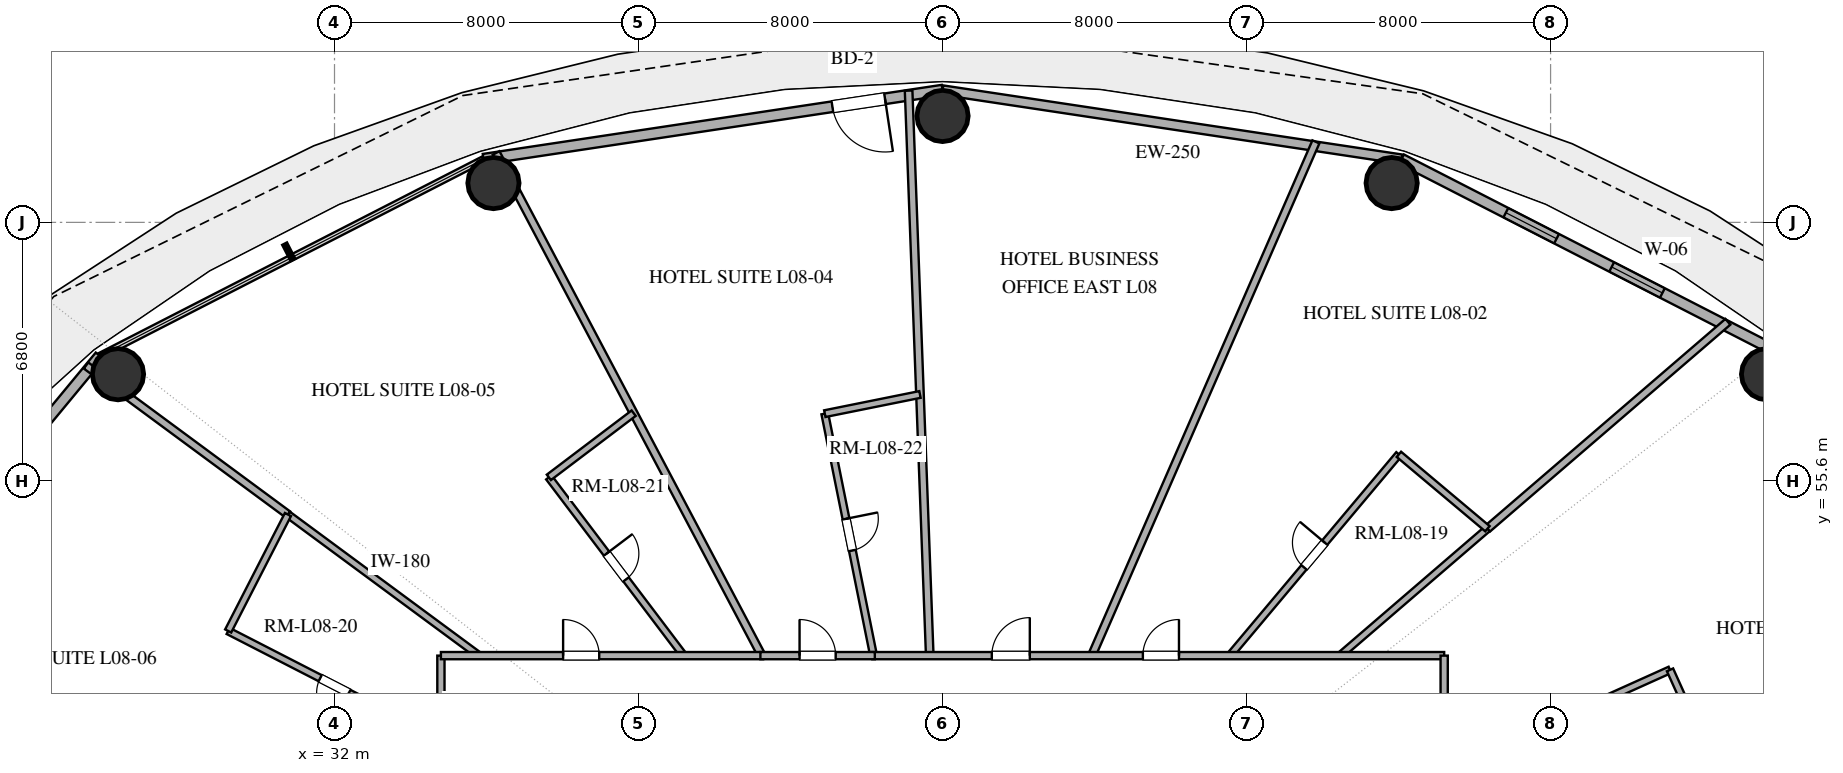
"""IFC4 building model, lengths in metres.
Left out: names, types, materials, properties, quantities, classifications, styles, units other than length and angle.
Written with IfcOpenShell. Run it as: python <this file> out.ifc"""

import sys

from ifc_helpers import new_model, si_unit, direction, frame, frame_2d, origin, origin_2d, place, context, subcontext, project, spatial, rectangle, hollow_circle, extrude, element, fill, save


model = new_model("IFC4")
c1 = context("Model", 3, precision=1e-05, world=origin(), true_north=direction((0.0, 1.0)))
c2 = subcontext(c1, "Body", "Model", "MODEL_VIEW")
j1 = project(units=[si_unit("LENGTHUNIT", "METRE"), si_unit("PLANEANGLEUNIT", "RADIAN")], contexts=[c1])
p1 = place(None, origin())
s1 = spatial("IfcSite", under=j1, at=p1, CompositionType="ELEMENT")
p2 = place(p1, origin())
s2 = spatial("IfcBuilding", under=s1, at=p2, CompositionType="ELEMENT")
p3 = place(p2, frame((0.0, 0.0, 39.0)))
s3 = spatial("IfcBuildingStorey", under=s2, at=p3, CompositionType="ELEMENT", Elevation=39.0)
for number, where, z_axis, x_axis in (
    (1, (69.697, 58.405, 0.0), (0.0, 0.0, 1.0), (1.0, 0.0, 0.0)),
    (2, (59.818, 63.434, 0.0), (0.0, 0.0, 1.0), (1.0, 0.0, 0.0)),
    (3, (48.0, 65.2, 0.0), (0.0, 0.0, 1.0), (1.0, 0.0, 0.0)),
    (4, (36.182, 63.434, 0.0), (0.0, 0.0, 1.0), (1.0, 0.0, 0.0)),
    (5, (26.303, 58.405, 0.0), (0.0, 0.0, 1.0), (1.0, 0.0, 0.0)),
):
    element("IfcColumn", number, at=place(p3, frame(where, z_axis=z_axis, x_axis=x_axis)), inside=s3, PredefinedType="COLUMN", context=c2, shape_type="SweptSolid", body=[
        extrude(hollow_circle(Radius=0.675, WallThickness=0.036, at=origin_2d()), origin(), (0.0, 0.0, 1.0), 3.38),
    ])
p4 = place(p3, frame((70.174, 58.886, 0.0), z_axis=(0.0, 0.0, 1.0), x_axis=(-0.889853976658, 0.456245438581, 0.0)))
e6 = element("IfcWall", 6, at=p4, inside=s3, PredefinedType="SOLIDWALL", context=c2, shape_type="SweptSolid", body=[
    extrude(rectangle(XDim=11.346, YDim=0.28, at=frame_2d((5.673, 0.0))), origin(), (0.0, 0.0, 1.0), 3.38),
])
p5 = place(p4, frame((3.632, 0.0, 0.85)))
e7 = element("IfcOpeningElement", 7, at=p5, cuts=e6, PredefinedType="OPENING", context=c2, shape_type="SweptSolid", body=[
    extrude(rectangle(XDim=1.5, YDim=2.0, at=frame_2d((0.75, 1.0))), frame((0.0, 0.15, 0.0), z_axis=(0.0, -1.0, 0.0), x_axis=(1.0, 0.0, 0.0)), (0.0, 0.0, 1.0), 0.3),
])
p6 = place(p4, frame((6.761, 0.0, 0.85)))
e8 = element("IfcOpeningElement", 8, at=p6, cuts=e6, PredefinedType="OPENING", context=c2, shape_type="SweptSolid", body=[
    extrude(rectangle(XDim=1.5, YDim=2.0, at=frame_2d((0.75, 1.0))), frame((0.0, 0.15, 0.0), z_axis=(0.0, -1.0, 0.0), x_axis=(1.0, 0.0, 0.0)), (0.0, 0.0, 1.0), 0.3),
])
p7 = place(p3, frame((60.078, 64.062, 0.0), z_axis=(0.0, 0.0, 1.0), x_axis=(-0.988864835849, 0.148816452121, 0.0)))
e9 = element("IfcWall", 9, at=p7, inside=s3, PredefinedType="SOLIDWALL", context=c2, shape_type="SweptSolid", body=[
    extrude(rectangle(XDim=12.214, YDim=0.25, at=frame_2d((6.107, 0.0))), origin(), (0.0, 0.0, 1.0), 3.38),
])
p8 = place(p3, frame((48.0, 65.88, 0.0), z_axis=(0.0, 0.0, 1.0), x_axis=(-0.988864835849, -0.148816452121, 0.0)))
e10 = element("IfcWall", 10, at=p8, inside=s3, PredefinedType="SOLIDWALL", context=c2, shape_type="SweptSolid", body=[
    extrude(rectangle(XDim=12.214, YDim=0.28, at=frame_2d((6.107, 0.0))), origin(), (0.0, 0.0, 1.0), 3.38),
])
p9 = place(p8, frame((1.531, 0.0, 0.0)))
e11 = element("IfcOpeningElement", 11, at=p9, cuts=e10, PredefinedType="OPENING", context=c2, shape_type="SweptSolid", body=[
    extrude(rectangle(XDim=1.4, YDim=2.2, at=frame_2d((0.7, 1.1))), frame((0.0, 0.15, 0.0), z_axis=(0.0, -1.0, 0.0), x_axis=(1.0, 0.0, 0.0)), (0.0, 0.0, 1.0), 0.3),
])
p10 = place(p3, frame((25.826, 58.886, 0.0), z_axis=(0.0, 0.0, 1.0), x_axis=(-0.637296809613, -0.770618437657, 0.0)))
e12 = element("IfcWall", 12, at=p10, inside=s3, PredefinedType="SOLIDWALL", context=c2, shape_type="SweptSolid", body=[
    extrude(rectangle(XDim=10.053, YDim=0.28, at=frame_2d((5.027, 0.0))), origin(), (0.0, 0.0, 1.0), 3.38),
])
p11 = place(p10, frame((2.998, 0.0, 0.85)))
e13 = element("IfcOpeningElement", 13, at=p11, cuts=e12, PredefinedType="OPENING", context=c2, shape_type="SweptSolid", body=[
    extrude(rectangle(XDim=1.2, YDim=1.6, at=frame_2d((0.6, 0.8))), frame((0.0, 0.15, 0.0), z_axis=(0.0, -1.0, 0.0), x_axis=(1.0, 0.0, 0.0)), (0.0, 0.0, 1.0), 0.3),
])
p12 = place(p10, frame((5.73, 0.0, 0.85)))
e14 = element("IfcOpeningElement", 14, at=p12, cuts=e12, PredefinedType="OPENING", context=c2, shape_type="SweptSolid", body=[
    extrude(rectangle(XDim=1.2, YDim=1.6, at=frame_2d((0.6, 0.8))), frame((0.0, 0.15, 0.0), z_axis=(0.0, -1.0, 0.0), x_axis=(1.0, 0.0, 0.0)), (0.0, 0.0, 1.0), 0.3),
])
p13 = place(p3, frame((57.825, 64.519, 0.0), z_axis=(0.0, 0.0, 1.0), x_axis=(-0.399884283786, -0.916565632991, 0.0)))
e15 = element("IfcWall", 15, at=p13, inside=s3, PredefinedType="PARTITIONING", context=c2, shape_type="SweptSolid", body=[
    extrude(rectangle(XDim=14.749, YDim=0.2, at=frame_2d((7.375, 0.0))), origin(), (0.0, 0.0, 1.0), 2.74),
])
p14 = place(p3, frame((68.666, 59.784, 0.0), z_axis=(0.0, 0.0, 1.0), x_axis=(-0.757966817992, -0.652293111127, 0.0)))
e16 = element("IfcWall", 16, at=p14, inside=s3, PredefinedType="PARTITIONING", context=c2, shape_type="SweptSolid", body=[
    extrude(rectangle(XDim=8.347, YDim=0.2, at=frame_2d((4.174, 0.0))), origin(), (0.0, 0.0, 1.0), 2.74),
])
p15 = place(p3, frame((47.663, 51.0, 0.0), z_axis=(0.0, 0.0, 1.0), x_axis=(-0.037384345878, 0.999300961014, 0.0)))
e17 = element("IfcWall", 17, at=p15, inside=s3, PredefinedType="PARTITIONING", context=c2, shape_type="SweptSolid", body=[
    extrude(rectangle(XDim=14.877, YDim=0.2, at=frame_2d((7.438, 0.0))), origin(), (0.0, 0.0, 1.0), 2.74),
])
p16 = place(p3, frame((43.243, 51.0, 0.0), z_axis=(0.0, 0.0, 1.0), x_axis=(-0.467270516294, 0.884114395654, 0.0)))
e18 = element("IfcWall", 18, at=p16, inside=s3, PredefinedType="PARTITIONING", context=c2, shape_type="SweptSolid", body=[
    extrude(rectangle(XDim=14.96, YDim=0.2, at=frame_2d((7.48, 0.0))), origin(), (0.0, 0.0, 1.0), 2.74),
])
p17 = place(p3, frame((55.56, 51.0, 0.0), z_axis=(0.0, 0.0, 1.0), x_axis=(0.643154836645, 0.765736153058, 0.0)))
e19 = element("IfcWall", 19, at=p17, inside=s3, PredefinedType="PLUMBINGWALL", context=c2, shape_type="SweptSolid", body=[
    extrude(rectangle(XDim=6.917, YDim=0.18, at=frame_2d((3.458, 0.0))), origin(), (0.0, 0.0, 1.0), 2.74),
])
p18 = place(p17, frame((3.034, 0.0, 0.0)))
e20 = element("IfcOpeningElement", 20, at=p18, cuts=e19, PredefinedType="OPENING", context=c2, shape_type="SweptSolid", body=[
    extrude(rectangle(XDim=0.85, YDim=2.1, at=frame_2d((0.425, 1.05))), frame((0.0, 0.1, 0.0), z_axis=(0.0, -1.0, 0.0), x_axis=(1.0, 0.0, 0.0)), (0.0, 0.0, 1.0), 0.2),
])
p19 = place(p3, frame((25.462, 58.634, 0.0), z_axis=(0.0, 0.0, 1.0), x_axis=(0.804616980297, -0.593794168898, 0.0)))
e21 = element("IfcWall", 21, at=p19, inside=s3, PredefinedType="PARTITIONING", context=c2, shape_type="SweptSolid", body=[
    extrude(rectangle(XDim=6.603, YDim=0.2, at=frame_2d((3.302, 0.0))), origin(), (0.0, 0.0, 1.0), 2.74),
])
p20 = place(p3, frame((67.143, 50.626, 0.0), z_axis=(0.0, 0.0, 1.0), x_axis=(-0.911702033518, -0.410852044025, 0.0)))
e22 = element("IfcWall", 22, at=p20, inside=s3, PredefinedType="PLUMBINGWALL", context=c2, shape_type="SweptSolid", body=[
    extrude(rectangle(XDim=6.519, YDim=0.18, at=frame_2d((3.259, 0.0))), origin(), (0.0, 0.0, 1.0), 2.74),
])
p21 = place(p20, frame((2.834, 0.0, 0.0)))
e23 = element("IfcOpeningElement", 23, at=p21, cuts=e22, PredefinedType="OPENING", context=c2, shape_type="SweptSolid", body=[
    extrude(rectangle(XDim=0.85, YDim=2.1, at=frame_2d((0.425, 1.05))), frame((0.0, 0.1, 0.0), z_axis=(0.0, -1.0, 0.0), x_axis=(1.0, 0.0, 0.0)), (0.0, 0.0, 1.0), 0.2),
])
p22 = place(p3, frame((44.902, 57.367, 0.0), z_axis=(0.0, 0.0, 1.0), x_axis=(0.197648412503, -0.980272974755, 0.0)))
e24 = element("IfcWall", 24, at=p22, inside=s3, PredefinedType="PLUMBINGWALL", context=c2, shape_type="SweptSolid", body=[
    extrude(rectangle(XDim=6.495, YDim=0.18, at=frame_2d((3.248, 0.0))), origin(), (0.0, 0.0, 1.0), 2.74),
])
p23 = place(p22, frame((2.823, 0.0, 0.0)))
e25 = element("IfcOpeningElement", 25, at=p23, cuts=e24, PredefinedType="OPENING", context=c2, shape_type="SweptSolid", body=[
    extrude(rectangle(XDim=0.85, YDim=2.1, at=frame_2d((0.425, 1.05))), frame((0.0, 0.1, 0.0), z_axis=(0.0, -1.0, 0.0), x_axis=(1.0, 0.0, 0.0)), (0.0, 0.0, 1.0), 0.2),
])
p24 = place(p3, frame((34.8, 48.776, 0.0), z_axis=(0.0, 0.0, 1.0), x_axis=(-0.889651376734, 0.456640370395, 0.0)))
e26 = element("IfcWall", 26, at=p24, inside=s3, PredefinedType="PLUMBINGWALL", context=c2, shape_type="SweptSolid", body=[
    extrude(rectangle(XDim=6.292, YDim=0.18, at=frame_2d((3.146, 0.0))), origin(), (0.0, 0.0, 1.0), 2.74),
])
p25 = place(p24, frame((2.721, 0.0, 0.0)))
e27 = element("IfcOpeningElement", 27, at=p25, cuts=e26, PredefinedType="OPENING", context=c2, shape_type="SweptSolid", body=[
    extrude(rectangle(XDim=0.85, YDim=2.1, at=frame_2d((0.425, 1.05))), frame((0.0, 0.1, 0.0), z_axis=(0.0, -1.0, 0.0), x_axis=(1.0, 0.0, 0.0)), (0.0, 0.0, 1.0), 0.2),
])
p26 = place(p3, frame((30.775, 54.713, 0.0), z_axis=(0.0, 0.0, 1.0), x_axis=(0.804582519588, -0.593840861825, 0.0)))
e28 = element("IfcWall", 28, at=p26, inside=s3, PredefinedType="PLUMBINGWALL", context=c2, shape_type="SweptSolid", body=[
    extrude(rectangle(XDim=6.252, YDim=0.18, at=frame_2d((3.126, 0.0))), origin(), (0.0, 0.0, 1.0), 2.74),
])
p27 = place(p3, frame((34.8, 36.017, 0.0), z_axis=(0.0, 0.0, 1.0), x_axis=(0.0, 1.0, 0.0)))
e29 = element("IfcWall", 29, at=p27, inside=s3, PredefinedType="PARTITIONING", context=c2, shape_type="SweptSolid", body=[
    extrude(rectangle(XDim=14.983, YDim=0.19, at=frame_2d((7.492, 0.0))), origin(), (0.0, 0.0, 1.0), 2.74),
])
p28 = place(p27, frame((4.963, 0.0, 0.0)))
e30 = element("IfcOpeningElement", 30, at=p28, cuts=e29, PredefinedType="OPENING", context=c2, shape_type="SweptSolid", body=[
    extrude(rectangle(XDim=1.0, YDim=2.2, at=frame_2d((0.5, 1.1))), frame((0.0, 0.105, 0.0), z_axis=(0.0, -1.0, 0.0), x_axis=(1.0, 0.0, 0.0)), (0.0, 0.0, 1.0), 0.21),
])
p29 = place(p27, frame((10.146, 0.0, 0.0)))
e31 = element("IfcOpeningElement", 31, at=p29, cuts=e29, PredefinedType="OPENING", context=c2, shape_type="SweptSolid", body=[
    extrude(rectangle(XDim=0.95, YDim=2.15, at=frame_2d((0.475, 1.075))), frame((0.0, 0.105, 0.0), z_axis=(0.0, -1.0, 0.0), x_axis=(1.0, 0.0, 0.0)), (0.0, 0.0, 1.0), 0.21),
])
p30 = place(p3, frame((37.64, 55.691, 0.0), z_axis=(0.0, 0.0, 1.0), x_axis=(0.603401299207, -0.797437691682, 0.0)))
e32 = element("IfcWall", 32, at=p30, inside=s3, PredefinedType="PLUMBINGWALL", context=c2, shape_type="SweptSolid", body=[
    extrude(rectangle(XDim=5.882, YDim=0.18, at=frame_2d((2.941, 0.0))), origin(), (0.0, 0.0, 1.0), 2.74),
])
p31 = place(p30, frame((2.516, 0.0, 0.0)))
e33 = element("IfcOpeningElement", 33, at=p31, cuts=e32, PredefinedType="OPENING", context=c2, shape_type="SweptSolid", body=[
    extrude(rectangle(XDim=0.85, YDim=2.1, at=frame_2d((0.425, 1.05))), frame((0.0, 0.1, 0.0), z_axis=(0.0, -1.0, 0.0), x_axis=(1.0, 0.0, 0.0)), (0.0, 0.0, 1.0), 0.2),
])
p32 = place(p3, frame((34.8, 51.0, 0.0), z_axis=(0.0, 0.0, 1.0), x_axis=(1.0, 0.0, 0.0)))
e34 = element("IfcWall", 34, at=p32, inside=s3, PredefinedType="PARTITIONING", context=c2, shape_type="SweptSolid", body=[
    extrude(rectangle(XDim=8.479, YDim=0.19, at=frame_2d((4.24, 0.0))), origin(), (0.0, 0.0, 1.0), 2.74),
])
p33 = place(p32, frame((3.216, 0.0, 0.0)))
e35 = element("IfcOpeningElement", 35, at=p33, cuts=e34, PredefinedType="OPENING", context=c2, shape_type="SweptSolid", body=[
    extrude(rectangle(XDim=0.95, YDim=2.15, at=frame_2d((0.475, 1.075))), frame((0.0, 0.105, 0.0), z_axis=(0.0, -1.0, 0.0), x_axis=(1.0, 0.0, 0.0)), (0.0, 0.0, 1.0), 0.21),
])
p34 = place(p3, frame((62.339, 54.339, 0.0), z_axis=(0.0, 0.0, 1.0), x_axis=(-0.757969199921, -0.652290343307, 0.0)))
e36 = element("IfcWall", 36, at=p34, inside=s3, PredefinedType="PLUMBINGWALL", context=c2, shape_type="SweptSolid", body=[
    extrude(rectangle(XDim=5.119, YDim=0.18, at=frame_2d((2.56, 0.0))), origin(), (0.0, 0.0, 1.0), 2.74),
])
p35 = place(p3, frame((46.153, 51.0, 0.0), z_axis=(0.0, 0.0, 1.0), x_axis=(1.0, 0.0, 0.0)))
e37 = element("IfcWall", 37, at=p35, inside=s3, PredefinedType="PARTITIONING", context=c2, shape_type="SweptSolid", body=[
    extrude(rectangle(XDim=15.047, YDim=0.19, at=frame_2d((7.524, 0.0))), origin(), (0.0, 0.0, 1.0), 2.74),
])
p36 = place(p35, frame((3.144, 0.0, 0.0)))
e38 = element("IfcOpeningElement", 38, at=p36, cuts=e37, PredefinedType="OPENING", context=c2, shape_type="SweptSolid", body=[
    extrude(rectangle(XDim=1.0, YDim=2.2, at=frame_2d((0.5, 1.1))), frame((0.0, 0.105, 0.0), z_axis=(0.0, -1.0, 0.0), x_axis=(1.0, 0.0, 0.0)), (0.0, 0.0, 1.0), 0.21),
])
p37 = place(p35, frame((7.119, 0.0, 0.0)))
e39 = element("IfcOpeningElement", 39, at=p37, cuts=e37, PredefinedType="OPENING", context=c2, shape_type="SweptSolid", body=[
    extrude(rectangle(XDim=0.95, YDim=2.15, at=frame_2d((0.475, 1.075))), frame((0.0, 0.105, 0.0), z_axis=(0.0, -1.0, 0.0), x_axis=(1.0, 0.0, 0.0)), (0.0, 0.0, 1.0), 0.21),
])
p38 = place(p3, frame((29.202, 51.649, 0.0), z_axis=(0.0, 0.0, 1.0), x_axis=(0.456659133546, 0.889641745732, 0.0)))
e40 = element("IfcWall", 40, at=p38, inside=s3, PredefinedType="PLUMBINGWALL", context=c2, shape_type="SweptSolid", body=[
    extrude(rectangle(XDim=3.444, YDim=0.18, at=frame_2d((1.722, 0.0))), origin(), (0.0, 0.0, 1.0), 2.74),
])
p39 = place(p3, frame((68.549, 47.506, 0.0), z_axis=(0.0, 0.0, 1.0), x_axis=(-0.410839223928, 0.911707810695, 0.0)))
e41 = element("IfcWall", 41, at=p39, inside=s3, PredefinedType="PLUMBINGWALL", context=c2, shape_type="SweptSolid", body=[
    extrude(rectangle(XDim=3.422, YDim=0.18, at=frame_2d((1.711, 0.0))), origin(), (0.0, 0.0, 1.0), 2.74),
])
p40 = place(p3, frame((61.2, 51.0, 0.0), z_axis=(0.0, 0.0, 1.0), x_axis=(0.0, -1.0, 0.0)))
e42 = element("IfcWall", 42, at=p40, inside=s3, PredefinedType="PARTITIONING", context=c2, shape_type="SweptSolid", body=[
    extrude(rectangle(XDim=3.087, YDim=0.19, at=frame_2d((1.543, 0.0))), origin(), (0.0, 0.0, 1.0), 2.74),
])
p41 = place(p40, frame((1.069, 0.0, 0.0)))
e43 = element("IfcOpeningElement", 43, at=p41, cuts=e42, PredefinedType="OPENING", context=c2, shape_type="SweptSolid", body=[
    extrude(rectangle(XDim=0.95, YDim=2.15, at=frame_2d((0.475, 1.075))), frame((0.0, 0.105, 0.0), z_axis=(0.0, -1.0, 0.0), x_axis=(1.0, 0.0, 0.0)), (0.0, 0.0, 1.0), 0.21),
])
p42 = place(p3, frame((60.008, 56.297, 0.0), z_axis=(0.0, 0.0, 1.0), x_axis=(0.765736471754, -0.643154457208, 0.0)))
e44 = element("IfcWall", 44, at=p42, inside=s3, PredefinedType="PLUMBINGWALL", context=c2, shape_type="SweptSolid", body=[
    extrude(rectangle(XDim=3.043, YDim=0.18, at=frame_2d((1.521, 0.0))), origin(), (0.0, 0.0, 1.0), 2.74),
])
p43 = place(p3, frame((43.207, 51.0, 0.0), z_axis=(0.0, 0.0, 1.0), x_axis=(1.0, 0.0, 0.0)))
e45 = element("IfcWall", 45, at=p43, inside=s3, PredefinedType="PARTITIONING", context=c2, shape_type="SweptSolid", body=[
    extrude(rectangle(XDim=3.011, YDim=0.19, at=frame_2d((1.505, 0.0))), origin(), (0.0, 0.0, 1.0), 2.74),
])
p44 = place(p43, frame((1.03, 0.0, 0.0)))
e46 = element("IfcOpeningElement", 46, at=p44, cuts=e45, PredefinedType="OPENING", context=c2, shape_type="SweptSolid", body=[
    extrude(rectangle(XDim=0.95, YDim=2.15, at=frame_2d((0.475, 1.075))), frame((0.0, 0.105, 0.0), z_axis=(0.0, -1.0, 0.0), x_axis=(1.0, 0.0, 0.0)), (0.0, 0.0, 1.0), 0.21),
])
p45 = place(p3, frame((39.872, 57.379, 0.0), z_axis=(0.0, 0.0, 1.0), x_axis=(-0.797438154909, -0.603400687019, 0.0)))
e47 = element("IfcWall", 47, at=p45, inside=s3, PredefinedType="PLUMBINGWALL", context=c2, shape_type="SweptSolid", body=[
    extrude(rectangle(XDim=2.798, YDim=0.18, at=frame_2d((1.399, 0.0))), origin(), (0.0, 0.0, 1.0), 2.74),
])
p46 = place(p3, frame((47.406, 57.872, 0.0), z_axis=(0.0, 0.0, 1.0), x_axis=(-0.980278128955, -0.1976228476, 0.0)))
e48 = element("IfcWall", 48, at=p46, inside=s3, PredefinedType="PLUMBINGWALL", context=c2, shape_type="SweptSolid", body=[
    extrude(rectangle(XDim=2.555, YDim=0.18, at=frame_2d((1.277, 0.0))), origin(), (0.0, 0.0, 1.0), 2.74),
])
p47 = place(p5, origin())
e49 = element("IfcWindow", 49, at=p47, inside=s3, PartitioningType="SINGLE_PANEL", PredefinedType="WINDOW", context=c2, shape_type="SweptSolid", body=[
    extrude(rectangle(XDim=1.5, YDim=2.0, at=frame_2d((0.75, 1.0))), frame((0.0, 0.03, 0.0), z_axis=(0.0, -1.0, 0.0), x_axis=(1.0, 0.0, 0.0)), (0.0, 0.0, 1.0), 0.06),
])
fill(e7, e49)
p48 = place(p6, origin())
e50 = element("IfcWindow", 50, at=p48, inside=s3, PartitioningType="SINGLE_PANEL", PredefinedType="WINDOW", context=c2, shape_type="SweptSolid", body=[
    extrude(rectangle(XDim=1.5, YDim=2.0, at=frame_2d((0.75, 1.0))), frame((0.0, 0.03, 0.0), z_axis=(0.0, -1.0, 0.0), x_axis=(1.0, 0.0, 0.0)), (0.0, 0.0, 1.0), 0.06),
])
fill(e8, e50)
p49 = place(p9, origin())
e51 = element("IfcDoor", 51, at=p49, inside=s3, OperationType="SINGLE_SWING_LEFT", PredefinedType="DOOR", context=c2, shape_type="SweptSolid", body=[
    extrude(rectangle(XDim=1.4, YDim=2.2, at=frame_2d((0.7, 1.1))), frame((0.0, 0.025, 0.0), z_axis=(0.0, -1.0, 0.0), x_axis=(1.0, 0.0, 0.0)), (0.0, 0.0, 1.0), 0.05),
])
fill(e11, e51)
p50 = place(p18, origin())
e52 = element("IfcDoor", 52, at=p50, inside=s3, OperationType="SINGLE_SWING_RIGHT", PredefinedType="DOOR", context=c2, shape_type="SweptSolid", body=[
    extrude(rectangle(XDim=0.85, YDim=2.1, at=frame_2d((0.425, 1.05))), frame((0.0, 0.025, 0.0), z_axis=(0.0, -1.0, 0.0), x_axis=(1.0, 0.0, 0.0)), (0.0, 0.0, 1.0), 0.05),
])
fill(e20, e52)
p51 = place(p23, origin())
e53 = element("IfcDoor", 53, at=p51, inside=s3, OperationType="SINGLE_SWING_LEFT", PredefinedType="DOOR", context=c2, shape_type="SweptSolid", body=[
    extrude(rectangle(XDim=0.85, YDim=2.1, at=frame_2d((0.425, 1.05))), frame((0.0, 0.025, 0.0), z_axis=(0.0, -1.0, 0.0), x_axis=(1.0, 0.0, 0.0)), (0.0, 0.0, 1.0), 0.05),
])
fill(e25, e53)
p52 = place(p25, origin())
e54 = element("IfcDoor", 54, at=p52, inside=s3, OperationType="SINGLE_SWING_LEFT", PredefinedType="DOOR", context=c2, shape_type="SweptSolid", body=[
    extrude(rectangle(XDim=0.85, YDim=2.1, at=frame_2d((0.425, 1.05))), frame((0.0, 0.025, 0.0), z_axis=(0.0, -1.0, 0.0), x_axis=(1.0, 0.0, 0.0)), (0.0, 0.0, 1.0), 0.05),
])
fill(e27, e54)
p53 = place(p31, origin())
e55 = element("IfcDoor", 55, at=p53, inside=s3, OperationType="SINGLE_SWING_LEFT", PredefinedType="DOOR", context=c2, shape_type="SweptSolid", body=[
    extrude(rectangle(XDim=0.85, YDim=2.1, at=frame_2d((0.425, 1.05))), frame((0.0, 0.025, 0.0), z_axis=(0.0, -1.0, 0.0), x_axis=(1.0, 0.0, 0.0)), (0.0, 0.0, 1.0), 0.05),
])
fill(e33, e55)
p54 = place(p33, origin())
e56 = element("IfcDoor", 56, at=p54, inside=s3, OperationType="SINGLE_SWING_LEFT", PredefinedType="DOOR", context=c2, shape_type="SweptSolid", body=[
    extrude(rectangle(XDim=0.95, YDim=2.15, at=frame_2d((0.475, 1.075))), frame((0.0, 0.025, 0.0), z_axis=(0.0, -1.0, 0.0), x_axis=(1.0, 0.0, 0.0)), (0.0, 0.0, 1.0), 0.05),
])
fill(e35, e56)
p55 = place(p36, origin())
e57 = element("IfcDoor", 57, at=p55, inside=s3, OperationType="SINGLE_SWING_RIGHT", PredefinedType="DOOR", context=c2, shape_type="SweptSolid", body=[
    extrude(rectangle(XDim=1.0, YDim=2.2, at=frame_2d((0.5, 1.1))), frame((0.0, 0.025, 0.0), z_axis=(0.0, -1.0, 0.0), x_axis=(1.0, 0.0, 0.0)), (0.0, 0.0, 1.0), 0.05),
])
fill(e38, e57)
p56 = place(p37, origin())
e58 = element("IfcDoor", 58, at=p56, inside=s3, OperationType="SINGLE_SWING_RIGHT", PredefinedType="DOOR", context=c2, shape_type="SweptSolid", body=[
    extrude(rectangle(XDim=0.95, YDim=2.15, at=frame_2d((0.475, 1.075))), frame((0.0, 0.025, 0.0), z_axis=(0.0, -1.0, 0.0), x_axis=(1.0, 0.0, 0.0)), (0.0, 0.0, 1.0), 0.05),
])
fill(e39, e58)
p57 = place(p44, origin())
e59 = element("IfcDoor", 59, at=p57, inside=s3, OperationType="SINGLE_SWING_LEFT", PredefinedType="DOOR", context=c2, shape_type="SweptSolid", body=[
    extrude(rectangle(XDim=0.95, YDim=2.15, at=frame_2d((0.475, 1.075))), frame((0.0, 0.025, 0.0), z_axis=(0.0, -1.0, 0.0), x_axis=(1.0, 0.0, 0.0)), (0.0, 0.0, 1.0), 0.05),
])
fill(e46, e59)
save(model, sys.argv[1])
